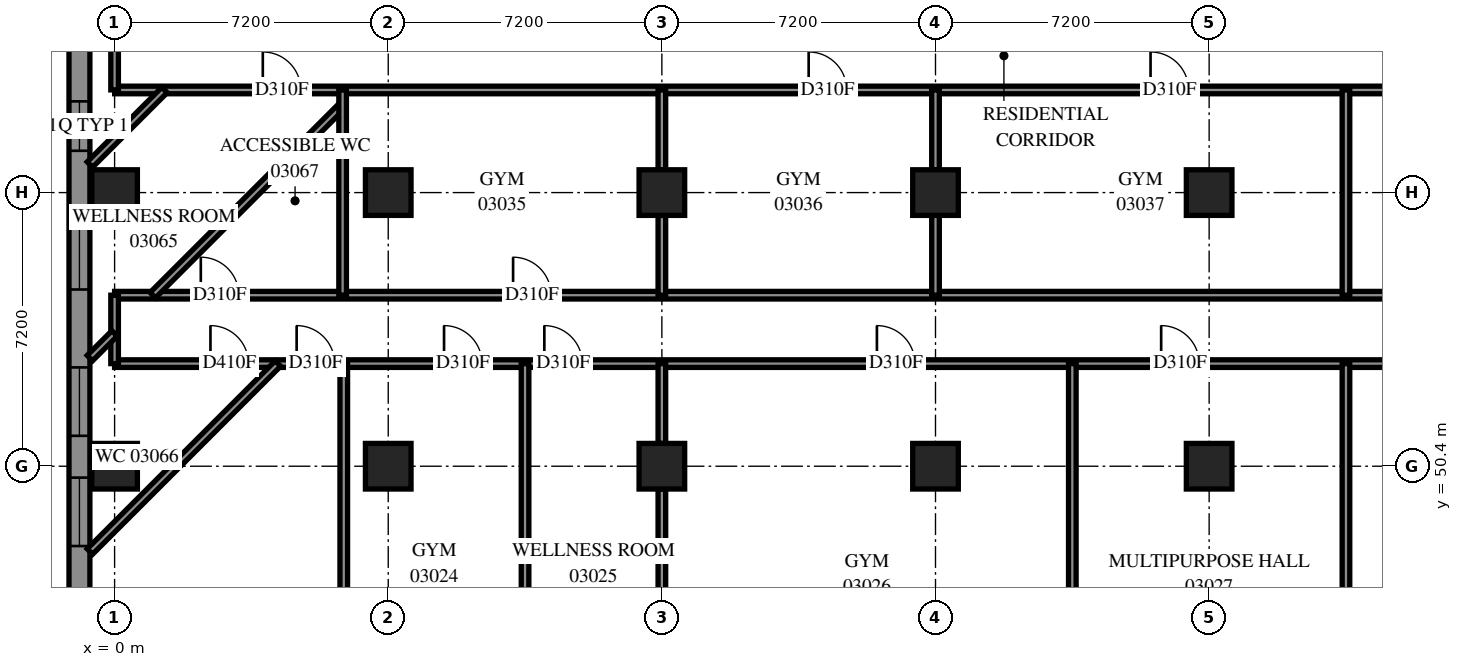
"""IFC4 building model, lengths in metres.
Left out: names, types, materials, properties, quantities, classifications, styles, units other than length and angle.
Written with IfcOpenShell. Run it as: python <this file> out.ifc"""

import sys

from ifc_helpers import new_model, si_unit, direction, frame, frame_2d, origin, origin_2d, place, context, subcontext, project, spatial, polyline, rectangle, outline, extrude, element, fill, save


model = new_model("IFC4")
c1 = context("Model", 3, precision=1e-05, world=origin(), true_north=direction((0.0, 1.0)))
c2 = subcontext(c1, "Body", "Model", "MODEL_VIEW")
j1 = project(units=[si_unit("LENGTHUNIT", "METRE"), si_unit("PLANEANGLEUNIT", "RADIAN")], contexts=[c1])
p1 = place(None, origin())
s1 = spatial("IfcSite", under=j1, at=p1, CompositionType="ELEMENT")
p2 = place(p1, origin())
s2 = spatial("IfcBuilding", under=s1, at=p2, CompositionType="ELEMENT")
p3 = place(p2, frame((0.0, 0.0, 14.4)))
s3 = spatial("IfcBuildingStorey", under=s2, at=p3, CompositionType="ELEMENT", Elevation=14.4)
for number, where, z_axis, x_axis in (
    (1, (0.0, 50.4, 0.0), (0.0, 0.0, 1.0), (1.0, 0.0, 0.0)),
    (2, (0.0, 57.6, 0.0), (0.0, 0.0, 1.0), (1.0, 0.0, 0.0)),
    (3, (7.2, 50.4, 0.0), (0.0, 0.0, 1.0), (1.0, 0.0, 0.0)),
    (4, (7.2, 57.6, 0.0), (0.0, 0.0, 1.0), (1.0, 0.0, 0.0)),
    (5, (14.4, 50.4, 0.0), (0.0, 0.0, 1.0), (1.0, 0.0, 0.0)),
    (6, (14.4, 57.6, 0.0), (0.0, 0.0, 1.0), (1.0, 0.0, 0.0)),
    (7, (21.6, 50.4, 0.0), (0.0, 0.0, 1.0), (1.0, 0.0, 0.0)),
    (8, (21.6, 57.6, 0.0), (0.0, 0.0, 1.0), (1.0, 0.0, 0.0)),
    (9, (28.8, 50.4, 0.0), (0.0, 0.0, 1.0), (1.0, 0.0, 0.0)),
    (10, (28.8, 57.6, 0.0), (0.0, 0.0, 1.0), (1.0, 0.0, 0.0)),
):
    element("IfcColumn", number, at=place(p3, frame(where, z_axis=z_axis, x_axis=x_axis)), inside=s3, PredefinedType="COLUMN", context=c2, shape_type="SweptSolid", body=[
        extrude(rectangle(XDim=1.2, YDim=1.2, at=origin_2d()), origin(), (0.0, 0.0, 1.0), 3.8),
    ])
p4 = place(p3, frame((-0.925, 71.725, 0.0), z_axis=(0.0, 0.0, 1.0), x_axis=(0.0, -1.0, 0.0)))
e11 = element("IfcWall", 11, at=p4, inside=s3, PredefinedType="SOLIDWALL", context=c2, shape_type="SweptSolid", body=[
    extrude(outline(polyline([(-0.275, -0.275), (28.525, -0.275), (27.975, 0.275), (0.275, 0.275), (-0.275, -0.275)])), origin(), (0.0, 0.0, 1.0), 3.8),
])
p5 = place(p4, frame((1.0, 0.0, 0.7)))
e12 = element("IfcOpeningElement", 12, at=p5, cuts=e11, PredefinedType="OPENING", context=c2, shape_type="SweptSolid", body=[
    extrude(rectangle(XDim=1.8, YDim=2.6, at=frame_2d((0.9, 1.3))), frame((0.0, 0.285, 0.0), z_axis=(0.0, -1.0, 0.0), x_axis=(1.0, 0.0, 0.0)), (0.0, 0.0, 1.0), 0.57),
])
p6 = place(p4, frame((4.225, 0.0, 0.7)))
e13 = element("IfcOpeningElement", 13, at=p6, cuts=e11, PredefinedType="OPENING", context=c2, shape_type="SweptSolid", body=[
    extrude(rectangle(XDim=1.8, YDim=2.6, at=frame_2d((0.9, 1.3))), frame((0.0, 0.285, 0.0), z_axis=(0.0, -1.0, 0.0), x_axis=(1.0, 0.0, 0.0)), (0.0, 0.0, 1.0), 0.57),
])
p7 = place(p4, frame((7.675, 0.0, 0.7)))
e14 = element("IfcOpeningElement", 14, at=p7, cuts=e11, PredefinedType="OPENING", context=c2, shape_type="SweptSolid", body=[
    extrude(rectangle(XDim=1.8, YDim=2.6, at=frame_2d((0.9, 1.3))), frame((0.0, 0.285, 0.0), z_axis=(0.0, -1.0, 0.0), x_axis=(1.0, 0.0, 0.0)), (0.0, 0.0, 1.0), 0.57),
])
p8 = place(p4, frame((14.875, 0.0, 0.7)))
e15 = element("IfcOpeningElement", 15, at=p8, cuts=e11, PredefinedType="OPENING", context=c2, shape_type="SweptSolid", body=[
    extrude(rectangle(XDim=1.8, YDim=2.6, at=frame_2d((0.9, 1.3))), frame((0.0, 0.285, 0.0), z_axis=(0.0, -1.0, 0.0), x_axis=(1.0, 0.0, 0.0)), (0.0, 0.0, 1.0), 0.57),
])
p9 = place(p4, frame((18.725, 0.0, 0.7)))
e16 = element("IfcOpeningElement", 16, at=p9, cuts=e11, PredefinedType="OPENING", context=c2, shape_type="SweptSolid", body=[
    extrude(rectangle(XDim=1.8, YDim=2.6, at=frame_2d((0.9, 1.3))), frame((0.0, 0.285, 0.0), z_axis=(0.0, -1.0, 0.0), x_axis=(1.0, 0.0, 0.0)), (0.0, 0.0, 1.0), 0.57),
])
p10 = place(p4, frame((21.625, 0.0, 0.7)))
e17 = element("IfcOpeningElement", 17, at=p10, cuts=e11, PredefinedType="OPENING", context=c2, shape_type="SweptSolid", body=[
    extrude(rectangle(XDim=1.8, YDim=2.6, at=frame_2d((0.9, 1.3))), frame((0.0, 0.285, 0.0), z_axis=(0.0, -1.0, 0.0), x_axis=(1.0, 0.0, 0.0)), (0.0, 0.0, 1.0), 0.57),
])
p11 = place(p4, frame((25.45, 0.0, 0.7)))
e18 = element("IfcOpeningElement", 18, at=p11, cuts=e11, PredefinedType="OPENING", context=c2, shape_type="SweptSolid", body=[
    extrude(rectangle(XDim=1.8, YDim=2.6, at=frame_2d((0.9, 1.3))), frame((0.0, 0.285, 0.0), z_axis=(0.0, -1.0, 0.0), x_axis=(1.0, 0.0, 0.0)), (0.0, 0.0, 1.0), 0.57),
])
p12 = place(p4, frame((11.725, 0.0, 0.45)))
e19 = element("IfcOpeningElement", 19, at=p12, cuts=e11, PredefinedType="OPENING", context=c2, shape_type="SweptSolid", body=[
    extrude(rectangle(XDim=1.3, YDim=2.5, at=frame_2d((0.65, 1.25))), frame((0.0, 0.285, 0.0), z_axis=(0.0, -1.0, 0.0), x_axis=(1.0, 0.0, 0.0)), (0.0, 0.0, 1.0), 0.57),
])
p13 = place(p3, frame((0.0, 54.9, 0.0), z_axis=(0.0, 0.0, 1.0), x_axis=(1.0, 0.0, 0.0)))
e20 = element("IfcWall", 20, at=p13, inside=s3, PredefinedType="PARTITIONING", context=c2, shape_type="SweptSolid", body=[
    extrude(rectangle(XDim=54.8, YDim=0.2, at=frame_2d((27.4, 0.0))), origin(), (0.0, 0.0, 1.0), 3.8),
])
p14 = place(p13, frame((10.485, 0.0, 0.0)))
e21 = element("IfcOpeningElement", 21, at=p14, cuts=e20, PredefinedType="OPENING", context=c2, shape_type="SweptSolid", body=[
    extrude(rectangle(XDim=1.0, YDim=2.1, at=frame_2d((0.5, 1.05))), frame((0.0, 0.11, 0.0), z_axis=(0.0, -1.0, 0.0), x_axis=(1.0, 0.0, 0.0)), (0.0, 0.0, 1.0), 0.22),
])
p15 = place(p13, frame((52.902, 0.0, 0.0)))
e22 = element("IfcOpeningElement", 22, at=p15, cuts=e20, PredefinedType="OPENING", context=c2, shape_type="SweptSolid", body=[
    extrude(rectangle(XDim=1.0, YDim=2.1, at=frame_2d((0.5, 1.05))), frame((0.0, 0.11, 0.0), z_axis=(0.0, -1.0, 0.0), x_axis=(1.0, 0.0, 0.0)), (0.0, 0.0, 1.0), 0.22),
])
p16 = place(p13, frame((2.268, 0.0, 0.0)))
e23 = element("IfcOpeningElement", 23, at=p16, cuts=e20, PredefinedType="OPENING", context=c2, shape_type="SweptSolid", body=[
    extrude(rectangle(XDim=1.0, YDim=2.1, at=frame_2d((0.5, 1.05))), frame((0.0, 0.11, 0.0), z_axis=(0.0, -1.0, 0.0), x_axis=(1.0, 0.0, 0.0)), (0.0, 0.0, 1.0), 0.22),
])
p17 = place(p3, frame((0.0, 53.1, 0.0), z_axis=(0.0, 0.0, 1.0), x_axis=(1.0, 0.0, 0.0)))
e24 = element("IfcWall", 24, at=p17, inside=s3, PredefinedType="PARTITIONING", context=c2, shape_type="SweptSolid", body=[
    extrude(rectangle(XDim=54.8, YDim=0.2, at=frame_2d((27.4, 0.0))), origin(), (0.0, 0.0, 1.0), 3.8),
])
p18 = place(p17, frame((8.669, 0.0, 0.0)))
e25 = element("IfcOpeningElement", 25, at=p18, cuts=e24, PredefinedType="OPENING", context=c2, shape_type="SweptSolid", body=[
    extrude(rectangle(XDim=1.0, YDim=2.1, at=frame_2d((0.5, 1.05))), frame((0.0, 0.11, 0.0), z_axis=(0.0, -1.0, 0.0), x_axis=(1.0, 0.0, 0.0)), (0.0, 0.0, 1.0), 0.22),
])
p19 = place(p17, frame((11.307, 0.0, 0.0)))
e26 = element("IfcOpeningElement", 26, at=p19, cuts=e24, PredefinedType="OPENING", context=c2, shape_type="SweptSolid", body=[
    extrude(rectangle(XDim=1.0, YDim=2.1, at=frame_2d((0.5, 1.05))), frame((0.0, 0.11, 0.0), z_axis=(0.0, -1.0, 0.0), x_axis=(1.0, 0.0, 0.0)), (0.0, 0.0, 1.0), 0.22),
])
p20 = place(p17, frame((20.058, 0.0, 0.0)))
e27 = element("IfcOpeningElement", 27, at=p20, cuts=e24, PredefinedType="OPENING", context=c2, shape_type="SweptSolid", body=[
    extrude(rectangle(XDim=1.0, YDim=2.1, at=frame_2d((0.5, 1.05))), frame((0.0, 0.11, 0.0), z_axis=(0.0, -1.0, 0.0), x_axis=(1.0, 0.0, 0.0)), (0.0, 0.0, 1.0), 0.22),
])
p21 = place(p17, frame((27.538, 0.0, 0.0)))
e28 = element("IfcOpeningElement", 28, at=p21, cuts=e24, PredefinedType="OPENING", context=c2, shape_type="SweptSolid", body=[
    extrude(rectangle(XDim=1.0, YDim=2.1, at=frame_2d((0.5, 1.05))), frame((0.0, 0.11, 0.0), z_axis=(0.0, -1.0, 0.0), x_axis=(1.0, 0.0, 0.0)), (0.0, 0.0, 1.0), 0.22),
])
p22 = place(p17, frame((36.542, 0.0, 0.0)))
e29 = element("IfcOpeningElement", 29, at=p22, cuts=e24, PredefinedType="OPENING", context=c2, shape_type="SweptSolid", body=[
    extrude(rectangle(XDim=1.0, YDim=2.1, at=frame_2d((0.5, 1.05))), frame((0.0, 0.11, 0.0), z_axis=(0.0, -1.0, 0.0), x_axis=(1.0, 0.0, 0.0)), (0.0, 0.0, 1.0), 0.22),
])
p23 = place(p17, frame((48.858, 0.0, 0.0)))
e30 = element("IfcOpeningElement", 30, at=p23, cuts=e24, PredefinedType="OPENING", context=c2, shape_type="SweptSolid", body=[
    extrude(rectangle(XDim=1.0, YDim=2.1, at=frame_2d((0.5, 1.05))), frame((0.0, 0.11, 0.0), z_axis=(0.0, -1.0, 0.0), x_axis=(1.0, 0.0, 0.0)), (0.0, 0.0, 1.0), 0.22),
])
p24 = place(p17, frame((2.522, 0.0, 0.0)))
e31 = element("IfcOpeningElement", 31, at=p24, cuts=e24, PredefinedType="OPENING", context=c2, shape_type="SweptSolid", body=[
    extrude(rectangle(XDim=1.0, YDim=2.1, at=frame_2d((0.5, 1.05))), frame((0.0, 0.11, 0.0), z_axis=(0.0, -1.0, 0.0), x_axis=(1.0, 0.0, 0.0)), (0.0, 0.0, 1.0), 0.22),
])
p25 = place(p17, frame((4.79, 0.0, 0.0)))
e32 = element("IfcOpeningElement", 32, at=p25, cuts=e24, PredefinedType="OPENING", context=c2, shape_type="SweptSolid", body=[
    extrude(rectangle(XDim=1.0, YDim=2.1, at=frame_2d((0.5, 1.05))), frame((0.0, 0.11, 0.0), z_axis=(0.0, -1.0, 0.0), x_axis=(1.0, 0.0, 0.0)), (0.0, 0.0, 1.0), 0.22),
])
p26 = place(p3, frame((0.002, 60.3, 0.0), z_axis=(0.0, 0.0, 1.0), x_axis=(1.0, 0.0, 0.0)))
e33 = element("IfcWall", 33, at=p26, inside=s3, PredefinedType="PARTITIONING", context=c2, shape_type="SweptSolid", body=[
    extrude(rectangle(XDim=54.798, YDim=0.2, at=frame_2d((27.399, 0.0))), origin(), (0.0, 0.0, 1.0), 3.8),
])
p27 = place(p26, frame((18.261, 0.0, 0.0)))
e34 = element("IfcOpeningElement", 34, at=p27, cuts=e33, PredefinedType="OPENING", context=c2, shape_type="SweptSolid", body=[
    extrude(rectangle(XDim=1.0, YDim=2.1, at=frame_2d((0.5, 1.05))), frame((0.0, 0.11, 0.0), z_axis=(0.0, -1.0, 0.0), x_axis=(1.0, 0.0, 0.0)), (0.0, 0.0, 1.0), 0.22),
])
p28 = place(p26, frame((27.256, 0.0, 0.0)))
e35 = element("IfcOpeningElement", 35, at=p28, cuts=e33, PredefinedType="OPENING", context=c2, shape_type="SweptSolid", body=[
    extrude(rectangle(XDim=1.0, YDim=2.1, at=frame_2d((0.5, 1.05))), frame((0.0, 0.11, 0.0), z_axis=(0.0, -1.0, 0.0), x_axis=(1.0, 0.0, 0.0)), (0.0, 0.0, 1.0), 0.22),
])
p29 = place(p26, frame((36.54, 0.0, 0.0)))
e36 = element("IfcOpeningElement", 36, at=p29, cuts=e33, PredefinedType="OPENING", context=c2, shape_type="SweptSolid", body=[
    extrude(rectangle(XDim=1.0, YDim=2.1, at=frame_2d((0.5, 1.05))), frame((0.0, 0.11, 0.0), z_axis=(0.0, -1.0, 0.0), x_axis=(1.0, 0.0, 0.0)), (0.0, 0.0, 1.0), 0.22),
])
p30 = place(p26, frame((47.06, 0.0, 0.0)))
e37 = element("IfcOpeningElement", 37, at=p30, cuts=e33, PredefinedType="OPENING", context=c2, shape_type="SweptSolid", body=[
    extrude(rectangle(XDim=1.0, YDim=2.1, at=frame_2d((0.5, 1.05))), frame((0.0, 0.11, 0.0), z_axis=(0.0, -1.0, 0.0), x_axis=(1.0, 0.0, 0.0)), (0.0, 0.0, 1.0), 0.22),
])
p31 = place(p26, frame((3.898, 0.0, 0.0)))
e38 = element("IfcOpeningElement", 38, at=p31, cuts=e33, PredefinedType="OPENING", context=c2, shape_type="SweptSolid", body=[
    extrude(rectangle(XDim=1.0, YDim=2.1, at=frame_2d((0.5, 1.05))), frame((0.0, 0.11, 0.0), z_axis=(0.0, -1.0, 0.0), x_axis=(1.0, 0.0, 0.0)), (0.0, 0.0, 1.0), 0.22),
])
for number, where, z_axis, x_axis in (
    (39, (25.2, 42.0, 0.0), (0.0, 0.0, 1.0), (0.0, 1.0, 0.0)),
    (40, (32.4, 42.0, 0.0), (0.0, 0.0, 1.0), (0.0, 1.0, 0.0)),
):
    element("IfcWall", number, at=place(p3, frame(where, z_axis=z_axis, x_axis=x_axis)), inside=s3, PredefinedType="PARTITIONING", context=c2, shape_type="SweptSolid", body=[
        extrude(rectangle(XDim=11.1, YDim=0.2, at=frame_2d((5.55, 0.0))), origin(), (0.0, 0.0, 1.0), 3.8),
    ])
for number, where, z_axis, x_axis in (
    (41, (6.03, 42.55, 0.0), (0.0, 0.0, 1.0), (0.0, 1.0, 0.0)),
    (42, (10.8, 42.55, 0.0), (0.0, 0.0, 1.0), (0.0, 1.0, 0.0)),
):
    element("IfcWall", number, at=place(p3, frame(where, z_axis=z_axis, x_axis=x_axis)), inside=s3, PredefinedType="PARTITIONING", context=c2, shape_type="SweptSolid", body=[
        extrude(rectangle(XDim=10.55, YDim=0.2, at=frame_2d((5.275, 0.0))), origin(), (0.0, 0.0, 1.0), 3.8),
    ])
p32 = place(p3, frame((1.005, 54.901, 0.0), z_axis=(0.0, 0.0, 1.0), x_axis=(0.7071067812, 0.7071067812, 0.0)))
e43 = element("IfcWall", 43, at=p32, inside=s3, PredefinedType="PARTITIONING", context=c2, shape_type="SweptSolid", body=[
    extrude(rectangle(XDim=7.063, YDim=0.2, at=frame_2d((3.531, 0.0))), origin(), (0.0, 0.0, 1.0), 3.8),
])
p33 = place(p3, frame((-0.65, 48.154, 0.0), z_axis=(0.0, 0.0, 1.0), x_axis=(0.707099634, 0.7071139283, 0.0)))
e44 = element("IfcWall", 44, at=p33, inside=s3, PredefinedType="PARTITIONING", context=c2, shape_type="SweptSolid", body=[
    extrude(rectangle(XDim=6.996, YDim=0.2, at=frame_2d((3.498, 0.0))), origin(), (0.0, 0.0, 1.0), 3.8),
])
p34 = place(p3, frame((14.4, 43.8, 0.0), z_axis=(0.0, 0.0, 1.0), x_axis=(0.0, 1.0, 0.0)))
e45 = element("IfcWall", 45, at=p34, inside=s3, PredefinedType="PARTITIONING", context=c2, shape_type="SweptSolid", body=[
    extrude(rectangle(XDim=6.0, YDim=0.2, at=frame_2d((3.0, 0.0))), origin(), (0.0, 0.0, 1.0), 3.8),
])
for number, where, z_axis, x_axis in (
    (46, (6.0, 54.9, 0.0), (0.0, 0.0, 1.0), (0.0, 1.0, 0.0)),
    (47, (32.4, 54.9, 0.0), (0.0, 0.0, 1.0), (0.0, 1.0, 0.0)),
):
    element("IfcWall", number, at=place(p3, frame(where, z_axis=z_axis, x_axis=x_axis)), inside=s3, PredefinedType="PARTITIONING", context=c2, shape_type="SweptSolid", body=[
        extrude(rectangle(XDim=5.4, YDim=0.2, at=frame_2d((2.7, 0.0))), origin(), (0.0, 0.0, 1.0), 3.8),
    ])
p35 = place(p3, frame((-0.65, 58.337, 0.0), z_axis=(0.0, 0.0, 1.0), x_axis=(0.7071067812, 0.7071067812, 0.0)))
e48 = element("IfcWall", 48, at=p35, inside=s3, PredefinedType="PARTITIONING", context=c2, shape_type="SweptSolid", body=[
    extrude(rectangle(XDim=2.777, YDim=0.2, at=frame_2d((1.388, 0.0))), origin(), (0.0, 0.0, 1.0), 3.8),
])
for number, where, z_axis, x_axis in (
    (49, (14.4, 51.0, 0.0), (0.0, 0.0, 1.0), (0.0, 1.0, 0.0)),
    (50, (14.4, 54.9, 0.0), (0.0, 0.0, 1.0), (0.0, 1.0, 0.0)),
    (51, (21.6, 54.9, 0.0), (0.0, 0.0, 1.0), (0.0, 1.0, 0.0)),
    (52, (14.4, 58.2, 0.0), (0.0, 0.0, 1.0), (0.0, 1.0, 0.0)),
    (53, (21.6, 58.2, 0.0), (0.0, 0.0, 1.0), (0.0, 1.0, 0.0)),
):
    element("IfcWall", number, at=place(p3, frame(where, z_axis=z_axis, x_axis=x_axis)), inside=s3, PredefinedType="PARTITIONING", context=c2, shape_type="SweptSolid", body=[
        extrude(rectangle(XDim=2.1, YDim=0.2, at=frame_2d((1.05, 0.0))), origin(), (0.0, 0.0, 1.0), 3.8),
    ])
p36 = place(p3, frame((0.0, 53.1, 0.0), z_axis=(0.0, 0.0, 1.0), x_axis=(0.0, 1.0, 0.0)))
e54 = element("IfcWall", 54, at=p36, inside=s3, PredefinedType="PARTITIONING", context=c2, shape_type="SweptSolid", body=[
    extrude(rectangle(XDim=1.8, YDim=0.2, at=frame_2d((0.9, 0.0))), origin(), (0.0, 0.0, 1.0), 3.2),
])
p37 = place(p3, frame((0.0, 60.302, 0.0), z_axis=(0.0, 0.0, 1.0), x_axis=(0.0, 1.0, 0.0)))
e55 = element("IfcWall", 55, at=p37, inside=s3, PredefinedType="PARTITIONING", context=c2, shape_type="SweptSolid", body=[
    extrude(rectangle(XDim=1.796, YDim=0.2, at=frame_2d((0.898, 0.0))), origin(), (0.0, 0.0, 1.0), 3.2),
])
p38 = place(p3, frame((-0.65, 53.246, 0.0), z_axis=(0.0, 0.0, 1.0), x_axis=(0.7071612431, 0.707052315, 0.0)))
e56 = element("IfcWall", 56, at=p38, inside=s3, PredefinedType="PARTITIONING", context=c2, shape_type="SweptSolid", body=[
    extrude(rectangle(XDim=0.918, YDim=0.2, at=frame_2d((0.459, 0.0))), origin(), (0.0, 0.0, 1.0), 3.8),
])
p39 = place(p8, origin())
e57 = element("IfcWindow", 57, at=p39, inside=s3, PartitioningType="SINGLE_PANEL", PredefinedType="WINDOW", context=c2, shape_type="SweptSolid", body=[
    extrude(rectangle(XDim=1.8, YDim=2.6, at=frame_2d((0.9, 1.3))), frame((0.0, 0.155, 0.0), z_axis=(0.0, -1.0, 0.0), x_axis=(1.0, 0.0, 0.0)), (0.0, 0.0, 1.0), 0.06),
])
fill(e15, e57)
p40 = place(p9, origin())
e58 = element("IfcWindow", 58, at=p40, inside=s3, PartitioningType="SINGLE_PANEL", PredefinedType="WINDOW", context=c2, shape_type="SweptSolid", body=[
    extrude(rectangle(XDim=1.8, YDim=2.6, at=frame_2d((0.9, 1.3))), frame((0.0, 0.155, 0.0), z_axis=(0.0, -1.0, 0.0), x_axis=(1.0, 0.0, 0.0)), (0.0, 0.0, 1.0), 0.06),
])
fill(e16, e58)
p41 = place(p10, origin())
e59 = element("IfcWindow", 59, at=p41, inside=s3, PartitioningType="SINGLE_PANEL", PredefinedType="WINDOW", context=c2, shape_type="SweptSolid", body=[
    extrude(rectangle(XDim=1.8, YDim=2.6, at=frame_2d((0.9, 1.3))), frame((0.0, 0.155, 0.0), z_axis=(0.0, -1.0, 0.0), x_axis=(1.0, 0.0, 0.0)), (0.0, 0.0, 1.0), 0.06),
])
fill(e17, e59)
p42 = place(p18, origin())
e60 = element("IfcDoor", 60, at=p42, inside=s3, OperationType="SINGLE_SWING_LEFT", PredefinedType="DOOR", context=c2, shape_type="SweptSolid", body=[
    extrude(rectangle(XDim=1.0, YDim=2.1, at=frame_2d((0.5, 1.05))), frame((0.0, 0.025, 0.0), z_axis=(0.0, -1.0, 0.0), x_axis=(1.0, 0.0, 0.0)), (0.0, 0.0, 1.0), 0.05),
])
fill(e25, e60)
p43 = place(p19, origin())
e61 = element("IfcDoor", 61, at=p43, inside=s3, OperationType="SINGLE_SWING_RIGHT", PredefinedType="DOOR", context=c2, shape_type="SweptSolid", body=[
    extrude(rectangle(XDim=1.0, YDim=2.1, at=frame_2d((0.5, 1.05))), frame((0.0, 0.025, 0.0), z_axis=(0.0, -1.0, 0.0), x_axis=(1.0, 0.0, 0.0)), (0.0, 0.0, 1.0), 0.05),
])
fill(e26, e61)
p44 = place(p20, origin())
e62 = element("IfcDoor", 62, at=p44, inside=s3, OperationType="SINGLE_SWING_LEFT", PredefinedType="DOOR", context=c2, shape_type="SweptSolid", body=[
    extrude(rectangle(XDim=1.0, YDim=2.1, at=frame_2d((0.5, 1.05))), frame((0.0, 0.025, 0.0), z_axis=(0.0, -1.0, 0.0), x_axis=(1.0, 0.0, 0.0)), (0.0, 0.0, 1.0), 0.05),
])
fill(e27, e62)
p45 = place(p21, origin())
e63 = element("IfcDoor", 63, at=p45, inside=s3, OperationType="SINGLE_SWING_RIGHT", PredefinedType="DOOR", context=c2, shape_type="SweptSolid", body=[
    extrude(rectangle(XDim=1.0, YDim=2.1, at=frame_2d((0.5, 1.05))), frame((0.0, 0.025, 0.0), z_axis=(0.0, -1.0, 0.0), x_axis=(1.0, 0.0, 0.0)), (0.0, 0.0, 1.0), 0.05),
])
fill(e28, e63)
p46 = place(p14, origin())
e64 = element("IfcDoor", 64, at=p46, inside=s3, OperationType="SINGLE_SWING_RIGHT", PredefinedType="DOOR", context=c2, shape_type="SweptSolid", body=[
    extrude(rectangle(XDim=1.0, YDim=2.1, at=frame_2d((0.5, 1.05))), frame((0.0, 0.025, 0.0), z_axis=(0.0, -1.0, 0.0), x_axis=(1.0, 0.0, 0.0)), (0.0, 0.0, 1.0), 0.05),
])
fill(e21, e64)
p47 = place(p27, origin())
e65 = element("IfcDoor", 65, at=p47, inside=s3, OperationType="SINGLE_SWING_LEFT", PredefinedType="DOOR", context=c2, shape_type="SweptSolid", body=[
    extrude(rectangle(XDim=1.0, YDim=2.1, at=frame_2d((0.5, 1.05))), frame((0.0, 0.025, 0.0), z_axis=(0.0, -1.0, 0.0), x_axis=(1.0, 0.0, 0.0)), (0.0, 0.0, 1.0), 0.05),
])
fill(e34, e65)
p48 = place(p28, origin())
e66 = element("IfcDoor", 66, at=p48, inside=s3, OperationType="SINGLE_SWING_LEFT", PredefinedType="DOOR", context=c2, shape_type="SweptSolid", body=[
    extrude(rectangle(XDim=1.0, YDim=2.1, at=frame_2d((0.5, 1.05))), frame((0.0, 0.025, 0.0), z_axis=(0.0, -1.0, 0.0), x_axis=(1.0, 0.0, 0.0)), (0.0, 0.0, 1.0), 0.05),
])
fill(e35, e66)
p49 = place(p31, origin())
e67 = element("IfcDoor", 67, at=p49, inside=s3, OperationType="SINGLE_SWING_LEFT", PredefinedType="DOOR", context=c2, shape_type="SweptSolid", body=[
    extrude(rectangle(XDim=1.0, YDim=2.1, at=frame_2d((0.5, 1.05))), frame((0.0, 0.025, 0.0), z_axis=(0.0, -1.0, 0.0), x_axis=(1.0, 0.0, 0.0)), (0.0, 0.0, 1.0), 0.05),
])
fill(e38, e67)
p50 = place(p24, origin())
e68 = element("IfcDoor", 68, at=p50, inside=s3, OperationType="SINGLE_SWING_RIGHT", PredefinedType="DOOR", context=c2, shape_type="SweptSolid", body=[
    extrude(rectangle(XDim=1.0, YDim=2.1, at=frame_2d((0.5, 1.05))), frame((0.0, 0.025, 0.0), z_axis=(0.0, -1.0, 0.0), x_axis=(1.0, 0.0, 0.0)), (0.0, 0.0, 1.0), 0.05),
])
fill(e31, e68)
p51 = place(p16, origin())
e69 = element("IfcDoor", 69, at=p51, inside=s3, OperationType="SINGLE_SWING_LEFT", PredefinedType="DOOR", context=c2, shape_type="SweptSolid", body=[
    extrude(rectangle(XDim=1.0, YDim=2.1, at=frame_2d((0.5, 1.05))), frame((0.0, 0.025, 0.0), z_axis=(0.0, -1.0, 0.0), x_axis=(1.0, 0.0, 0.0)), (0.0, 0.0, 1.0), 0.05),
])
fill(e23, e69)
p52 = place(p25, origin())
e70 = element("IfcDoor", 70, at=p52, inside=s3, OperationType="SINGLE_SWING_LEFT", PredefinedType="DOOR", context=c2, shape_type="SweptSolid", body=[
    extrude(rectangle(XDim=1.0, YDim=2.1, at=frame_2d((0.5, 1.05))), frame((0.0, 0.025, 0.0), z_axis=(0.0, -1.0, 0.0), x_axis=(1.0, 0.0, 0.0)), (0.0, 0.0, 1.0), 0.05),
])
fill(e32, e70)
p53 = place(p12, origin())
e71 = element("IfcWindow", 71, at=p53, inside=s3, PartitioningType="SINGLE_PANEL", PredefinedType="WINDOW", context=c2, shape_type="SweptSolid", body=[
    extrude(rectangle(XDim=1.3, YDim=2.5, at=frame_2d((0.65, 1.25))), frame((0.0, 0.155, 0.0), z_axis=(0.0, -1.0, 0.0), x_axis=(1.0, 0.0, 0.0)), (0.0, 0.0, 1.0), 0.06),
])
fill(e19, e71)
save(model, sys.argv[1])
